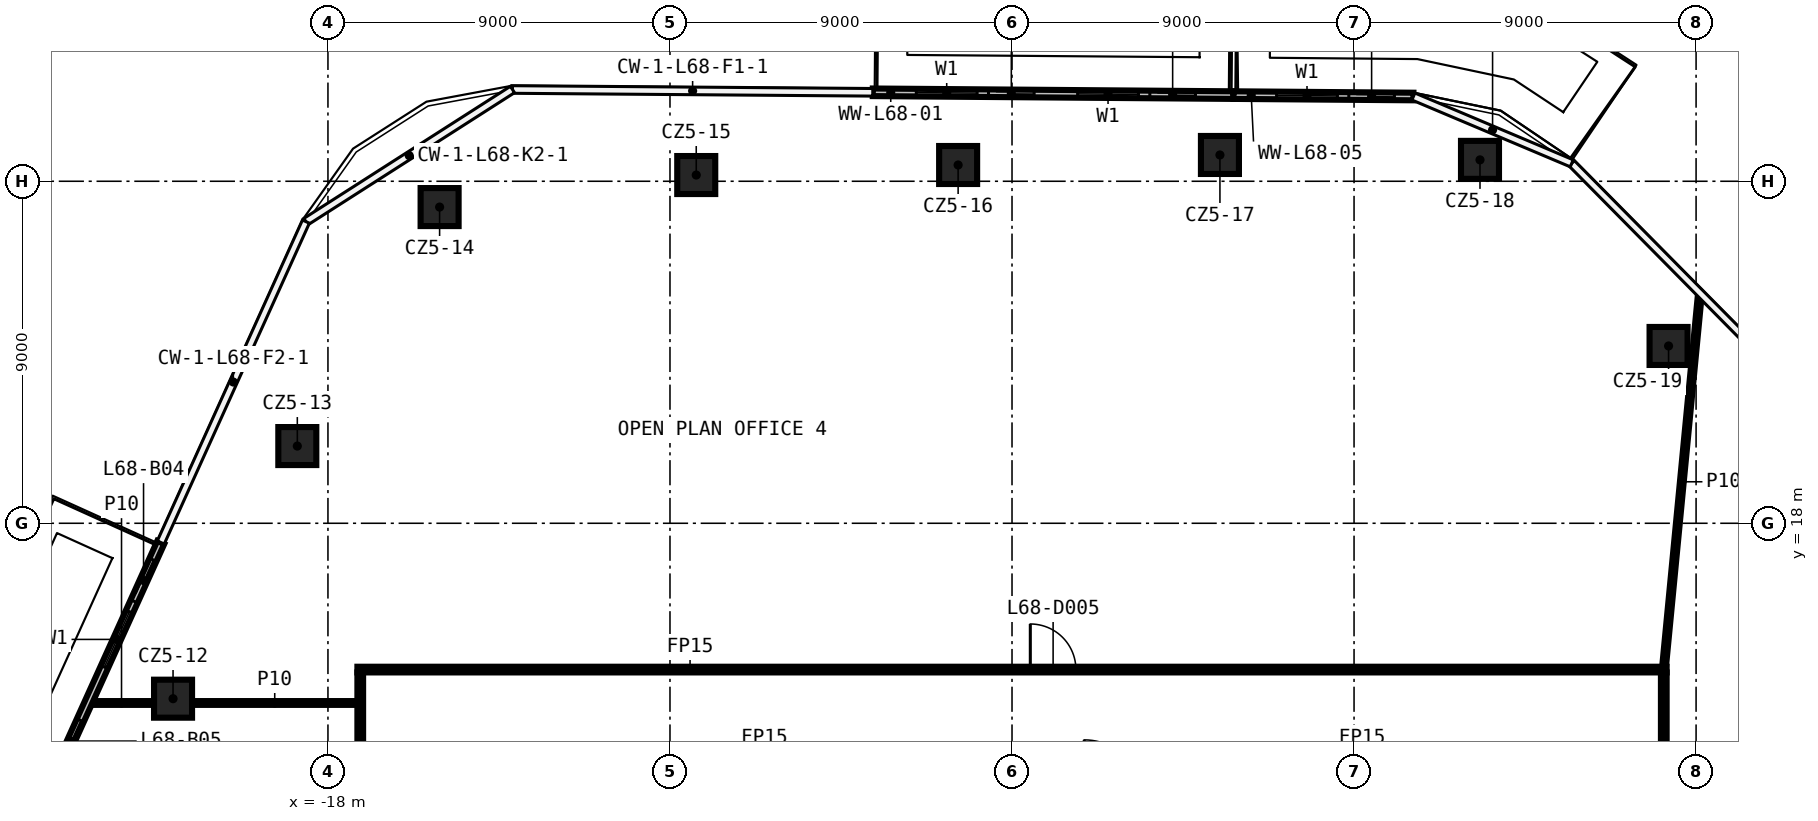
"""IFC4 building model, lengths in metres.
Left out: names, types, materials, properties, quantities, classifications, styles, units other than length and angle.
Written with IfcOpenShell. Run it as: python <this file> out.ifc"""

import sys

from ifc_helpers import new_model, si_unit, direction, frame, frame_2d, origin, origin_2d, place, context, subcontext, project, spatial, rectangle, extrude, element, fill, save


model = new_model("IFC4")
c1 = context("Model", 3, precision=1e-05, world=origin(), true_north=direction((0.0, 1.0)))
c2 = subcontext(c1, "Body", "Model", "MODEL_VIEW")
j1 = project(units=[si_unit("LENGTHUNIT", "METRE"), si_unit("PLANEANGLEUNIT", "RADIAN")], contexts=[c1])
p1 = place(None, origin())
s1 = spatial("IfcSite", under=j1, at=p1, CompositionType="ELEMENT")
p2 = place(p1, origin())
s2 = spatial("IfcBuilding", under=s1, at=p2, CompositionType="ELEMENT")
p3 = place(p2, frame((0.0, 0.0, 319.4)))
s3 = spatial("IfcBuildingStorey", under=s2, at=p3, CompositionType="ELEMENT", Elevation=319.4)
for number, where, z_axis, x_axis in (
    (1, (-22.076, 13.384, 0.0), (0.0, 0.0, 1.0), (1.0, 0.0, 0.0)),
    (2, (-18.806, 20.032, 0.0), (0.0, 0.0, 1.0), (1.0, 0.0, 0.0)),
    (3, (-15.062, 26.321, 0.0), (0.0, 0.0, 1.0), (1.0, 0.0, 0.0)),
    (4, (-8.309, 27.164, 0.0), (0.0, 0.0, 1.0), (1.0, 0.0, 0.0)),
    (5, (-1.418, 27.428, 0.0), (0.0, 0.0, 1.0), (1.0, 0.0, 0.0)),
    (6, (5.471, 27.692, 0.0), (0.0, 0.0, 1.0), (1.0, 0.0, 0.0)),
    (7, (12.314, 27.563, 0.0), (0.0, 0.0, 1.0), (1.0, 0.0, 0.0)),
    (8, (17.276, 22.666, 0.0), (0.0, 0.0, 1.0), (1.0, 0.0, 0.0)),
):
    element("IfcColumn", number, at=place(p3, frame(where, z_axis=z_axis, x_axis=x_axis)), inside=s3, PredefinedType="COLUMN", context=c2, shape_type="SweptSolid", body=[
        extrude(rectangle(XDim=1.0, YDim=1.0, at=origin_2d()), origin(), (0.0, 0.0, 1.0), 3.82),
    ])
p4 = place(p3, frame((-24.288, 13.271, 0.0), z_axis=(0.0, 0.0, 1.0), x_axis=(1.0, 0.0, 0.0)))
e9 = element("IfcWall", 9, at=p4, inside=s3, PredefinedType="PARTITIONING", context=c2, shape_type="SweptSolid", body=[
    extrude(rectangle(XDim=1.712, YDim=0.1, at=frame_2d((0.856, 0.0))), origin(), (0.0, 0.0, 1.0), 3.82),
])
p5 = place(p3, frame((-21.576, 13.271, 0.0), z_axis=(0.0, 0.0, 1.0), x_axis=(1.0, 0.0, 0.0)))
e10 = element("IfcWall", 10, at=p5, inside=s3, PredefinedType="PARTITIONING", context=c2, shape_type="SweptSolid", body=[
    extrude(rectangle(XDim=4.351, YDim=0.1, at=frame_2d((2.175, 0.0))), origin(), (0.0, 0.0, 1.0), 3.82),
])
p6 = place(p3, frame((-17.225, 14.15, 0.0), z_axis=(0.0, 0.0, 1.0), x_axis=(1.0, 0.0, 0.0)))
e11 = element("IfcWall", 11, at=p6, inside=s3, PredefinedType="PARTITIONING", context=c2, shape_type="SweptSolid", body=[
    extrude(rectangle(XDim=34.45, YDim=0.15, at=frame_2d((17.225, 0.0))), origin(), (0.0, 0.0, 1.0), 3.82),
])
p7 = place(p6, frame((17.706, 0.0, 0.0)))
e12 = element("IfcOpeningElement", 12, at=p7, cuts=e11, PredefinedType="OPENING", context=c2, shape_type="SweptSolid", body=[
    extrude(rectangle(XDim=1.2, YDim=2.1, at=frame_2d((0.6, 1.05))), frame((0.0, 0.085, 0.0), z_axis=(0.0, -1.0, 0.0), x_axis=(1.0, 0.0, 0.0)), (0.0, 0.0, 1.0), 0.17),
])
p8 = place(p3, frame((17.15, 14.15, 0.0), z_axis=(0.0, 0.0, 1.0), x_axis=(0.095686172631, 0.995411551253, 0.0)))
e13 = element("IfcWall", 13, at=p8, inside=s3, PredefinedType="PARTITIONING", context=c2, shape_type="SweptSolid", body=[
    extrude(rectangle(XDim=9.93, YDim=0.1, at=frame_2d((4.965, 0.0))), origin(), (0.0, 0.0, 1.0), 3.82),
])
p9 = place(p3, frame((17.15, 14.075, 0.0), z_axis=(0.0, 0.0, 1.0), x_axis=(0.0, -1.0, 0.0)))
e14 = element("IfcWall", 14, at=p9, inside=s3, PredefinedType="PARTITIONING", context=c2, shape_type="SweptSolid", body=[
    extrude(rectangle(XDim=28.15, YDim=0.15, at=frame_2d((14.075, 0.0))), origin(), (0.0, 0.0, 1.0), 3.82),
])
p10 = place(p9, frame((18.186, 0.0, 0.0)))
e15 = element("IfcOpeningElement", 15, at=p10, cuts=e14, PredefinedType="OPENING", context=c2, shape_type="SweptSolid", body=[
    extrude(rectangle(XDim=1.2, YDim=2.1, at=frame_2d((0.6, 1.05))), frame((0.0, 0.085, 0.0), z_axis=(0.0, -1.0, 0.0), x_axis=(1.0, 0.0, 0.0)), (0.0, 0.0, 1.0), 0.17),
])
p11 = place(p3, frame((-17.15, -14.075, 0.0), z_axis=(0.0, 0.0, 1.0), x_axis=(0.0, 1.0, 0.0)))
e16 = element("IfcWall", 16, at=p11, inside=s3, PredefinedType="PARTITIONING", context=c2, shape_type="SweptSolid", body=[
    extrude(rectangle(XDim=28.15, YDim=0.15, at=frame_2d((14.075, 0.0))), origin(), (0.0, 0.0, 1.0), 3.82),
])
p12 = place(p11, frame((18.298, 0.0, 0.0)))
e17 = element("IfcOpeningElement", 17, at=p12, cuts=e16, PredefinedType="OPENING", context=c2, shape_type="SweptSolid", body=[
    extrude(rectangle(XDim=1.2, YDim=2.1, at=frame_2d((0.6, 1.05))), frame((0.0, 0.085, 0.0), z_axis=(0.0, -1.0, 0.0), x_axis=(1.0, 0.0, 0.0)), (0.0, 0.0, 1.0), 0.17),
])
p13 = place(p3, frame((5.827, 29.267, 0.0), z_axis=(0.0, 0.0, 1.0), x_axis=(-0.999969823552, 0.007768653994, 0.0)))
e18 = element("IfcWall", 18, at=p13, inside=s3, PredefinedType="SOLIDWALL", context=c2, shape_type="SweptSolid", body=[
    extrude(rectangle(XDim=9.491, YDim=0.2, at=frame_2d((4.745, 0.0))), origin(), (0.0, 0.0, 1.0), 3.82),
])
p14 = place(p13, frame((2.5, 0.0, 0.6)))
e19 = element("IfcOpeningElement", 19, at=p14, cuts=e18, PredefinedType="OPENING", context=c2, shape_type="SweptSolid", body=[
    extrude(rectangle(XDim=1.6, YDim=2.4, at=frame_2d((0.8, 1.2))), frame((0.0, 0.11, 0.0), z_axis=(0.0, -1.0, 0.0), x_axis=(1.0, 0.0, 0.0)), (0.0, 0.0, 1.0), 0.22),
])
p15 = place(p13, frame((1.0, 0.0, 0.0)))
e20 = element("IfcOpeningElement", 20, at=p15, cuts=e18, PredefinedType="OPENING", context=c2, shape_type="SweptSolid", body=[
    extrude(rectangle(XDim=1.2, YDim=2.4, at=frame_2d((0.6, 1.2))), frame((0.0, 0.11, 0.0), z_axis=(0.0, -1.0, 0.0), x_axis=(1.0, 0.0, 0.0)), (0.0, 0.0, 1.0), 0.22),
])
p16 = place(p13, frame((6.745, 0.0, 0.6)))
e21 = element("IfcOpeningElement", 21, at=p16, cuts=e18, PredefinedType="OPENING", context=c2, shape_type="SweptSolid", body=[
    extrude(rectangle(XDim=1.6, YDim=2.4, at=frame_2d((0.8, 1.2))), frame((0.0, 0.11, 0.0), z_axis=(0.0, -1.0, 0.0), x_axis=(1.0, 0.0, 0.0)), (0.0, 0.0, 1.0), 0.22),
])
p17 = place(p13, frame((5.245, 0.0, 0.0)))
e22 = element("IfcOpeningElement", 22, at=p17, cuts=e18, PredefinedType="OPENING", context=c2, shape_type="SweptSolid", body=[
    extrude(rectangle(XDim=1.2, YDim=2.4, at=frame_2d((0.6, 1.2))), frame((0.0, 0.11, 0.0), z_axis=(0.0, -1.0, 0.0), x_axis=(1.0, 0.0, 0.0)), (0.0, 0.0, 1.0), 0.22),
])
p18 = place(p3, frame((10.562, 29.23, 0.0), z_axis=(0.0, 0.0, 1.0), x_axis=(-0.999969697406, 0.007784874423, 0.0)))
e23 = element("IfcWall", 23, at=p18, inside=s3, PredefinedType="SOLIDWALL", context=c2, shape_type="SweptSolid", body=[
    extrude(rectangle(XDim=4.736, YDim=0.2, at=frame_2d((2.368, 0.0))), origin(), (0.0, 0.0, 1.0), 3.82),
])
p19 = place(p18, frame((2.0, 0.0, 0.6)))
e24 = element("IfcOpeningElement", 24, at=p19, cuts=e23, PredefinedType="OPENING", context=c2, shape_type="SweptSolid", body=[
    extrude(rectangle(XDim=1.6, YDim=2.4, at=frame_2d((0.8, 1.2))), frame((0.0, 0.11, 0.0), z_axis=(0.0, -1.0, 0.0), x_axis=(1.0, 0.0, 0.0)), (0.0, 0.0, 1.0), 0.22),
])
p20 = place(p18, frame((0.5, 0.0, 0.0)))
e25 = element("IfcOpeningElement", 25, at=p20, cuts=e23, PredefinedType="OPENING", context=c2, shape_type="SweptSolid", body=[
    extrude(rectangle(XDim=1.2, YDim=2.4, at=frame_2d((0.6, 1.2))), frame((0.0, 0.11, 0.0), z_axis=(0.0, -1.0, 0.0), x_axis=(1.0, 0.0, 0.0)), (0.0, 0.0, 1.0), 0.22),
])
p21 = place(p3, frame((-22.399, 17.495, 0.0), z_axis=(0.0, 0.0, 1.0), x_axis=(-0.412123946496, -0.911127791654, 0.0)))
e26 = element("IfcWall", 26, at=p21, inside=s3, PredefinedType="SOLIDWALL", context=c2, shape_type="SweptSolid", body=[
    extrude(rectangle(XDim=23.18, YDim=0.2, at=frame_2d((11.59, 0.0))), origin(), (0.0, 0.0, 1.0), 3.82),
])
p22 = place(p21, frame((2.0, 0.0, 0.6)))
e27 = element("IfcOpeningElement", 27, at=p22, cuts=e26, PredefinedType="OPENING", context=c2, shape_type="SweptSolid", body=[
    extrude(rectangle(XDim=1.6, YDim=2.4, at=frame_2d((0.8, 1.2))), frame((0.0, 0.11, 0.0), z_axis=(0.0, -1.0, 0.0), x_axis=(1.0, 0.0, 0.0)), (0.0, 0.0, 1.0), 0.22),
])
p23 = place(p21, frame((0.5, 0.0, 0.0)))
e28 = element("IfcOpeningElement", 28, at=p23, cuts=e26, PredefinedType="OPENING", context=c2, shape_type="SweptSolid", body=[
    extrude(rectangle(XDim=1.2, YDim=2.4, at=frame_2d((0.6, 1.2))), frame((0.0, 0.11, 0.0), z_axis=(0.0, -1.0, 0.0), x_axis=(1.0, 0.0, 0.0)), (0.0, 0.0, 1.0), 0.22),
])
p24 = place(p21, frame((6.636, 0.0, 0.6)))
e29 = element("IfcOpeningElement", 29, at=p24, cuts=e26, PredefinedType="OPENING", context=c2, shape_type="SweptSolid", body=[
    extrude(rectangle(XDim=1.6, YDim=2.4, at=frame_2d((0.8, 1.2))), frame((0.0, 0.11, 0.0), z_axis=(0.0, -1.0, 0.0), x_axis=(1.0, 0.0, 0.0)), (0.0, 0.0, 1.0), 0.22),
])
p25 = place(p21, frame((5.136, 0.0, 0.0)))
e30 = element("IfcOpeningElement", 30, at=p25, cuts=e26, PredefinedType="OPENING", context=c2, shape_type="SweptSolid", body=[
    extrude(rectangle(XDim=1.2, YDim=2.4, at=frame_2d((0.6, 1.2))), frame((0.0, 0.11, 0.0), z_axis=(0.0, -1.0, 0.0), x_axis=(1.0, 0.0, 0.0)), (0.0, 0.0, 1.0), 0.22),
])
p26 = place(p21, frame((9.772, 0.0, 0.6)))
e31 = element("IfcOpeningElement", 31, at=p26, cuts=e26, PredefinedType="OPENING", context=c2, shape_type="SweptSolid", body=[
    extrude(rectangle(XDim=1.6, YDim=2.4, at=frame_2d((0.8, 1.2))), frame((0.0, 0.11, 0.0), z_axis=(0.0, -1.0, 0.0), x_axis=(1.0, 0.0, 0.0)), (0.0, 0.0, 1.0), 0.22),
])
p27 = place(p21, frame((11.672, 0.0, 0.0)))
e32 = element("IfcOpeningElement", 32, at=p27, cuts=e26, PredefinedType="OPENING", context=c2, shape_type="SweptSolid", body=[
    extrude(rectangle(XDim=1.2, YDim=2.4, at=frame_2d((0.6, 1.2))), frame((0.0, 0.11, 0.0), z_axis=(0.0, -1.0, 0.0), x_axis=(1.0, 0.0, 0.0)), (0.0, 0.0, 1.0), 0.22),
])
p28 = place(p21, frame((15.908, 0.0, 0.6)))
e33 = element("IfcOpeningElement", 33, at=p28, cuts=e26, PredefinedType="OPENING", context=c2, shape_type="SweptSolid", body=[
    extrude(rectangle(XDim=1.6, YDim=2.4, at=frame_2d((0.8, 1.2))), frame((0.0, 0.11, 0.0), z_axis=(0.0, -1.0, 0.0), x_axis=(1.0, 0.0, 0.0)), (0.0, 0.0, 1.0), 0.22),
])
p29 = place(p21, frame((14.408, 0.0, 0.0)))
e34 = element("IfcOpeningElement", 34, at=p29, cuts=e26, PredefinedType="OPENING", context=c2, shape_type="SweptSolid", body=[
    extrude(rectangle(XDim=1.2, YDim=2.4, at=frame_2d((0.6, 1.2))), frame((0.0, 0.11, 0.0), z_axis=(0.0, -1.0, 0.0), x_axis=(1.0, 0.0, 0.0)), (0.0, 0.0, 1.0), 0.22),
])
p30 = place(p21, frame((20.744, 0.0, 0.6)))
e35 = element("IfcOpeningElement", 35, at=p30, cuts=e26, PredefinedType="OPENING", context=c2, shape_type="SweptSolid", body=[
    extrude(rectangle(XDim=1.6, YDim=2.4, at=frame_2d((0.8, 1.2))), frame((0.0, 0.11, 0.0), z_axis=(0.0, -1.0, 0.0), x_axis=(1.0, 0.0, 0.0)), (0.0, 0.0, 1.0), 0.22),
])
p31 = place(p21, frame((19.244, 0.0, 0.0)))
e36 = element("IfcOpeningElement", 36, at=p31, cuts=e26, PredefinedType="OPENING", context=c2, shape_type="SweptSolid", body=[
    extrude(rectangle(XDim=1.2, YDim=2.4, at=frame_2d((0.6, 1.2))), frame((0.0, 0.11, 0.0), z_axis=(0.0, -1.0, 0.0), x_axis=(1.0, 0.0, 0.0)), (0.0, 0.0, 1.0), 0.22),
])
p32 = place(p7, origin())
e37 = element("IfcDoor", 37, at=p32, inside=s3, OperationType="SINGLE_SWING_RIGHT", PredefinedType="DOOR", context=c2, shape_type="SweptSolid", body=[
    extrude(rectangle(XDim=1.2, YDim=2.1, at=frame_2d((0.6, 1.05))), frame((0.0, 0.025, 0.0), z_axis=(0.0, -1.0, 0.0), x_axis=(1.0, 0.0, 0.0)), (0.0, 0.0, 1.0), 0.05),
])
fill(e12, e37)
p33 = place(p14, origin())
e38 = element("IfcWindow", 38, at=p33, inside=s3, PartitioningType="SINGLE_PANEL", PredefinedType="WINDOW", context=c2, shape_type="SweptSolid", body=[
    extrude(rectangle(XDim=1.6, YDim=2.4, at=frame_2d((0.8, 1.2))), frame((0.0, 0.03, 0.0), z_axis=(0.0, -1.0, 0.0), x_axis=(1.0, 0.0, 0.0)), (0.0, 0.0, 1.0), 0.06),
])
fill(e19, e38)
p34 = place(p15, origin())
e39 = element("IfcDoor", 39, at=p34, inside=s3, OperationType="SLIDING_TO_LEFT", PredefinedType="DOOR", context=c2, shape_type="SweptSolid", body=[
    extrude(rectangle(XDim=1.2, YDim=2.4, at=frame_2d((0.6, 1.2))), frame((0.0, 0.025, 0.0), z_axis=(0.0, -1.0, 0.0), x_axis=(1.0, 0.0, 0.0)), (0.0, 0.0, 1.0), 0.05),
])
fill(e20, e39)
p35 = place(p16, origin())
e40 = element("IfcWindow", 40, at=p35, inside=s3, PartitioningType="SINGLE_PANEL", PredefinedType="WINDOW", context=c2, shape_type="SweptSolid", body=[
    extrude(rectangle(XDim=1.6, YDim=2.4, at=frame_2d((0.8, 1.2))), frame((0.0, 0.03, 0.0), z_axis=(0.0, -1.0, 0.0), x_axis=(1.0, 0.0, 0.0)), (0.0, 0.0, 1.0), 0.06),
])
fill(e21, e40)
p36 = place(p17, origin())
e41 = element("IfcDoor", 41, at=p36, inside=s3, OperationType="SLIDING_TO_LEFT", PredefinedType="DOOR", context=c2, shape_type="SweptSolid", body=[
    extrude(rectangle(XDim=1.2, YDim=2.4, at=frame_2d((0.6, 1.2))), frame((0.0, 0.025, 0.0), z_axis=(0.0, -1.0, 0.0), x_axis=(1.0, 0.0, 0.0)), (0.0, 0.0, 1.0), 0.05),
])
fill(e22, e41)
p37 = place(p19, origin())
e42 = element("IfcWindow", 42, at=p37, inside=s3, PartitioningType="SINGLE_PANEL", PredefinedType="WINDOW", context=c2, shape_type="SweptSolid", body=[
    extrude(rectangle(XDim=1.6, YDim=2.4, at=frame_2d((0.8, 1.2))), frame((0.0, 0.03, 0.0), z_axis=(0.0, -1.0, 0.0), x_axis=(1.0, 0.0, 0.0)), (0.0, 0.0, 1.0), 0.06),
])
fill(e24, e42)
p38 = place(p20, origin())
e43 = element("IfcDoor", 43, at=p38, inside=s3, OperationType="SLIDING_TO_LEFT", PredefinedType="DOOR", context=c2, shape_type="SweptSolid", body=[
    extrude(rectangle(XDim=1.2, YDim=2.4, at=frame_2d((0.6, 1.2))), frame((0.0, 0.025, 0.0), z_axis=(0.0, -1.0, 0.0), x_axis=(1.0, 0.0, 0.0)), (0.0, 0.0, 1.0), 0.05),
])
fill(e25, e43)
p39 = place(p22, origin())
e44 = element("IfcWindow", 44, at=p39, inside=s3, PartitioningType="SINGLE_PANEL", PredefinedType="WINDOW", context=c2, shape_type="SweptSolid", body=[
    extrude(rectangle(XDim=1.6, YDim=2.4, at=frame_2d((0.8, 1.2))), frame((0.0, 0.03, 0.0), z_axis=(0.0, -1.0, 0.0), x_axis=(1.0, 0.0, 0.0)), (0.0, 0.0, 1.0), 0.06),
])
fill(e27, e44)
p40 = place(p23, origin())
e45 = element("IfcDoor", 45, at=p40, inside=s3, OperationType="SLIDING_TO_LEFT", PredefinedType="DOOR", context=c2, shape_type="SweptSolid", body=[
    extrude(rectangle(XDim=1.2, YDim=2.4, at=frame_2d((0.6, 1.2))), frame((0.0, 0.025, 0.0), z_axis=(0.0, -1.0, 0.0), x_axis=(1.0, 0.0, 0.0)), (0.0, 0.0, 1.0), 0.05),
])
fill(e28, e45)
p41 = place(p25, origin())
e46 = element("IfcDoor", 46, at=p41, inside=s3, OperationType="SLIDING_TO_LEFT", PredefinedType="DOOR", context=c2, shape_type="SweptSolid", body=[
    extrude(rectangle(XDim=1.2, YDim=2.4, at=frame_2d((0.6, 1.2))), frame((0.0, 0.025, 0.0), z_axis=(0.0, -1.0, 0.0), x_axis=(1.0, 0.0, 0.0)), (0.0, 0.0, 1.0), 0.05),
])
fill(e30, e46)
save(model, sys.argv[1])
